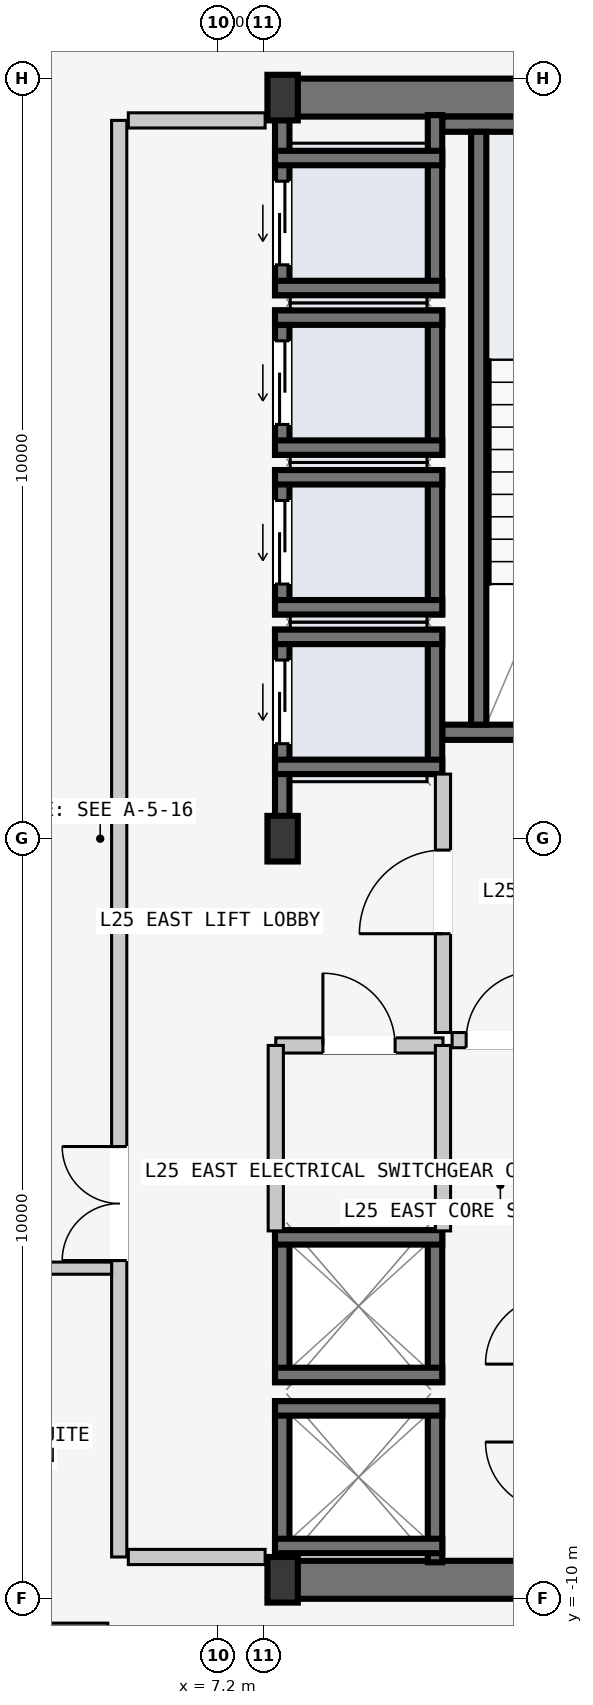
"""IFC4 building model, lengths in metres.
Left out: names, types, materials, properties, quantities, classifications, styles, units other than length and angle.
Written with IfcOpenShell. Run it as: python <this file> out.ifc"""

import sys

from ifc_helpers import new_model, si_unit, direction, frame, frame_2d, origin, origin_2d, place, context, subcontext, project, spatial, rectangle, i_section, extrude, element, fill, save


model = new_model("IFC4")
c1 = context("Model", 3, precision=1e-05, world=origin(), true_north=direction((0.0, 1.0)))
c2 = subcontext(c1, "Body", "Model", "MODEL_VIEW")
j1 = project(units=[si_unit("LENGTHUNIT", "METRE"), si_unit("PLANEANGLEUNIT", "RADIAN")], contexts=[c1])
p1 = place(None, origin())
s1 = spatial("IfcSite", under=j1, at=p1, CompositionType="ELEMENT")
p2 = place(p1, origin())
s2 = spatial("IfcBuilding", under=s1, at=p2, CompositionType="ELEMENT")
p3 = place(p2, frame((0.0, 0.0, 99.0)))
s3 = spatial("IfcBuildingStorey", under=s2, at=p3, CompositionType="ELEMENT", Elevation=99.0)
for number, where, z_axis, x_axis in (
    (1, (8.07, -9.75, -0.2), (0.0, 0.0, 1.0), (1.0, 0.0, 0.0)),
    (2, (8.07, 9.75, -0.2), (0.0, 0.0, 1.0), (1.0, 0.0, 0.0)),
):
    element("IfcWall", number, at=place(p3, frame(where, z_axis=z_axis, x_axis=x_axis)), inside=s3, PredefinedType="SHEAR", context=c2, shape_type="SweptSolid", body=[
        extrude(rectangle(XDim=6.46, YDim=0.5, at=frame_2d((3.23, 0.0))), origin(), (0.0, 0.0, 1.0), 3.6),
    ])
p4 = place(p3, frame((10.15, 1.4, -0.2), z_axis=(0.0, 0.0, 1.0), x_axis=(1.0, 0.0, 0.0)))
e3 = element("IfcWall", 3, at=p4, inside=s3, PredefinedType="SOLIDWALL", context=c2, shape_type="SweptSolid", body=[
    extrude(rectangle(XDim=4.1, YDim=0.2, at=frame_2d((2.05, 0.0))), origin(), (0.0, 0.0, 1.0), 3.6),
])
p5 = place(p4, frame((1.5, 0.0, 0.2)))
e4 = element("IfcOpeningElement", 4, at=p5, cuts=e3, PredefinedType="OPENING", context=c2, shape_type="SweptSolid", body=[
    extrude(rectangle(XDim=1.12, YDim=2.18, at=frame_2d((0.56, 1.09))), frame((0.0, 0.11, 0.0), z_axis=(0.0, -1.0, 0.0), x_axis=(1.0, 0.0, 0.0)), (0.0, 0.0, 1.0), 0.22),
])
p6 = place(p3, frame((10.15, 9.4, -0.2), z_axis=(0.0, 0.0, 1.0), x_axis=(1.0, 0.0, 0.0)))
e5 = element("IfcWall", 5, at=p6, inside=s3, PredefinedType="SOLIDWALL", context=c2, shape_type="SweptSolid", body=[
    extrude(rectangle(XDim=4.1, YDim=0.2, at=frame_2d((2.05, 0.0))), origin(), (0.0, 0.0, 1.0), 3.6),
])
p7 = place(p3, frame((10.63, 1.5, -0.2), z_axis=(0.0, 0.0, 1.0), x_axis=(0.0, 1.0, 0.0)))
e6 = element("IfcWall", 6, at=p7, inside=s3, PredefinedType="SOLIDWALL", context=c2, shape_type="SweptSolid", body=[
    extrude(rectangle(XDim=7.8, YDim=0.2, at=frame_2d((3.9, 0.0))), origin(), (0.0, 0.0, 1.0), 3.6),
])
for number, where, z_axis, x_axis in (
    (7, (8.05, -9.75, 0.0), (0.0, 0.0, 1.0), (1.0, 0.0, 0.0)),
    (8, (8.05, 0.0, 0.0), (0.0, 0.0, 1.0), (1.0, 0.0, 0.0)),
    (9, (8.05, 9.75, 0.0), (0.0, 0.0, 1.0), (1.0, 0.0, 0.0)),
):
    element("IfcColumn", number, at=place(p3, frame(where, z_axis=z_axis, x_axis=x_axis)), inside=s3, PredefinedType="COLUMN", context=c2, shape_type="SweptSolid", body=[
        extrude(i_section(OverallWidth=0.4, OverallDepth=0.6, WebThickness=0.022, FlangeThickness=0.036, at=origin_2d()), origin(), (0.0, 0.0, 1.0), 3.6),
    ])
p8 = place(p3, frame((8.045, 0.21, -0.2), z_axis=(0.0, 0.0, 1.0), x_axis=(0.0, 1.0, 0.0)))
e10 = element("IfcWall", 10, at=p8, inside=s3, PredefinedType="SOLIDWALL", context=c2, shape_type="SweptSolid", body=[
    extrude(rectangle(XDim=2.54, YDim=0.19, at=frame_2d((1.27, 0.0))), origin(), (0.0, 0.0, 1.0), 3.6),
])
p9 = place(p8, frame((1.04, 0.0, 0.2)))
e11 = element("IfcOpeningElement", 11, at=p9, cuts=e10, PredefinedType="OPENING", context=c2, shape_type="SweptSolid", body=[
    extrude(rectangle(XDim=1.1, YDim=2.2, at=frame_2d((0.55, 1.1))), frame((0.0, 0.105, 0.0), z_axis=(0.0, -1.0, 0.0), x_axis=(1.0, 0.0, 0.0)), (0.0, 0.0, 1.0), 0.21),
])
p10 = place(p3, frame((10.055, 0.85, -0.2), z_axis=(0.0, 0.0, 1.0), x_axis=(0.0, 1.0, 0.0)))
e12 = element("IfcWall", 12, at=p10, inside=s3, PredefinedType="SOLIDWALL", context=c2, shape_type="SweptSolid", body=[
    extrude(rectangle(XDim=1.9, YDim=0.19, at=frame_2d((0.95, 0.0))), origin(), (0.0, 0.0, 1.0), 3.6),
])
for number, where, z_axis, x_axis in (
    (13, (7.95, 2.655, -0.2), (0.0, 0.0, 1.0), (1.0, 0.0, 0.0)),
    (14, (7.95, 0.945, -0.2), (0.0, 0.0, 1.0), (1.0, 0.0, 0.0)),
):
    element("IfcWall", number, at=place(p3, frame(where, z_axis=z_axis, x_axis=x_axis)), inside=s3, PredefinedType="SOLIDWALL", context=c2, shape_type="SweptSolid", body=[
        extrude(rectangle(XDim=2.2, YDim=0.19, at=frame_2d((1.1, 0.0))), origin(), (0.0, 0.0, 1.0), 3.6),
    ])
p11 = place(p3, frame((8.045, 2.95, -0.2), z_axis=(0.0, 0.0, 1.0), x_axis=(0.0, 1.0, 0.0)))
e15 = element("IfcWall", 15, at=p11, inside=s3, PredefinedType="SOLIDWALL", context=c2, shape_type="SweptSolid", body=[
    extrude(rectangle(XDim=1.9, YDim=0.19, at=frame_2d((0.95, 0.0))), origin(), (0.0, 0.0, 1.0), 3.6),
])
p12 = place(p11, frame((0.4, 0.0, 0.2)))
e16 = element("IfcOpeningElement", 16, at=p12, cuts=e15, PredefinedType="OPENING", context=c2, shape_type="SweptSolid", body=[
    extrude(rectangle(XDim=1.1, YDim=2.2, at=frame_2d((0.55, 1.1))), frame((0.0, 0.105, 0.0), z_axis=(0.0, -1.0, 0.0), x_axis=(1.0, 0.0, 0.0)), (0.0, 0.0, 1.0), 0.21),
])
p13 = place(p3, frame((10.055, 2.95, -0.2), z_axis=(0.0, 0.0, 1.0), x_axis=(0.0, 1.0, 0.0)))
e17 = element("IfcWall", 17, at=p13, inside=s3, PredefinedType="SOLIDWALL", context=c2, shape_type="SweptSolid", body=[
    extrude(rectangle(XDim=1.9, YDim=0.19, at=frame_2d((0.95, 0.0))), origin(), (0.0, 0.0, 1.0), 3.6),
])
for number, where, z_axis, x_axis in (
    (18, (7.95, 4.755, -0.2), (0.0, 0.0, 1.0), (1.0, 0.0, 0.0)),
    (19, (7.95, 3.045, -0.2), (0.0, 0.0, 1.0), (1.0, 0.0, 0.0)),
):
    element("IfcWall", number, at=place(p3, frame(where, z_axis=z_axis, x_axis=x_axis)), inside=s3, PredefinedType="SOLIDWALL", context=c2, shape_type="SweptSolid", body=[
        extrude(rectangle(XDim=2.2, YDim=0.19, at=frame_2d((1.1, 0.0))), origin(), (0.0, 0.0, 1.0), 3.6),
    ])
p14 = place(p3, frame((8.045, 5.05, -0.2), z_axis=(0.0, 0.0, 1.0), x_axis=(0.0, 1.0, 0.0)))
e20 = element("IfcWall", 20, at=p14, inside=s3, PredefinedType="SOLIDWALL", context=c2, shape_type="SweptSolid", body=[
    extrude(rectangle(XDim=1.9, YDim=0.19, at=frame_2d((0.95, 0.0))), origin(), (0.0, 0.0, 1.0), 3.6),
])
p15 = place(p14, frame((0.4, 0.0, 0.2)))
e21 = element("IfcOpeningElement", 21, at=p15, cuts=e20, PredefinedType="OPENING", context=c2, shape_type="SweptSolid", body=[
    extrude(rectangle(XDim=1.1, YDim=2.2, at=frame_2d((0.55, 1.1))), frame((0.0, 0.105, 0.0), z_axis=(0.0, -1.0, 0.0), x_axis=(1.0, 0.0, 0.0)), (0.0, 0.0, 1.0), 0.21),
])
p16 = place(p3, frame((10.055, 5.05, -0.2), z_axis=(0.0, 0.0, 1.0), x_axis=(0.0, 1.0, 0.0)))
e22 = element("IfcWall", 22, at=p16, inside=s3, PredefinedType="SOLIDWALL", context=c2, shape_type="SweptSolid", body=[
    extrude(rectangle(XDim=1.9, YDim=0.19, at=frame_2d((0.95, 0.0))), origin(), (0.0, 0.0, 1.0), 3.6),
])
for number, where, z_axis, x_axis in (
    (23, (7.95, 6.855, -0.2), (0.0, 0.0, 1.0), (1.0, 0.0, 0.0)),
    (24, (7.95, 5.145, -0.2), (0.0, 0.0, 1.0), (1.0, 0.0, 0.0)),
):
    element("IfcWall", number, at=place(p3, frame(where, z_axis=z_axis, x_axis=x_axis)), inside=s3, PredefinedType="SOLIDWALL", context=c2, shape_type="SweptSolid", body=[
        extrude(rectangle(XDim=2.2, YDim=0.19, at=frame_2d((1.1, 0.0))), origin(), (0.0, 0.0, 1.0), 3.6),
    ])
p17 = place(p3, frame((8.045, 7.15, -0.2), z_axis=(0.0, 0.0, 1.0), x_axis=(0.0, 1.0, 0.0)))
e25 = element("IfcWall", 25, at=p17, inside=s3, PredefinedType="SOLIDWALL", context=c2, shape_type="SweptSolid", body=[
    extrude(rectangle(XDim=2.37, YDim=0.19, at=frame_2d((1.185, 0.0))), origin(), (0.0, 0.0, 1.0), 3.6),
])
p18 = place(p17, frame((0.4, 0.0, 0.2)))
e26 = element("IfcOpeningElement", 26, at=p18, cuts=e25, PredefinedType="OPENING", context=c2, shape_type="SweptSolid", body=[
    extrude(rectangle(XDim=1.1, YDim=2.2, at=frame_2d((0.55, 1.1))), frame((0.0, 0.105, 0.0), z_axis=(0.0, -1.0, 0.0), x_axis=(1.0, 0.0, 0.0)), (0.0, 0.0, 1.0), 0.21),
])
p19 = place(p3, frame((10.055, 7.15, -0.2), z_axis=(0.0, 0.0, 1.0), x_axis=(0.0, 1.0, 0.0)))
e27 = element("IfcWall", 27, at=p19, inside=s3, PredefinedType="SOLIDWALL", context=c2, shape_type="SweptSolid", body=[
    extrude(rectangle(XDim=2.37, YDim=0.19, at=frame_2d((1.185, 0.0))), origin(), (0.0, 0.0, 1.0), 3.6),
])
for number, where, z_axis, x_axis in (
    (28, (7.95, 8.955, -0.2), (0.0, 0.0, 1.0), (1.0, 0.0, 0.0)),
    (29, (7.95, 7.245, -0.2), (0.0, 0.0, 1.0), (1.0, 0.0, 0.0)),
):
    element("IfcWall", number, at=place(p3, frame(where, z_axis=z_axis, x_axis=x_axis)), inside=s3, PredefinedType="SOLIDWALL", context=c2, shape_type="SweptSolid", body=[
        extrude(rectangle(XDim=2.2, YDim=0.19, at=frame_2d((1.1, 0.0))), origin(), (0.0, 0.0, 1.0), 3.6),
    ])
for number, where, z_axis, x_axis in (
    (30, (8.045, -9.52, -0.2), (0.0, 0.0, 1.0), (0.0, 1.0, 0.0)),
    (31, (10.055, -9.52, -0.2), (0.0, 0.0, 1.0), (0.0, 1.0, 0.0)),
):
    element("IfcWall", number, at=place(p3, frame(where, z_axis=z_axis, x_axis=x_axis)), inside=s3, PredefinedType="SOLIDWALL", context=c2, shape_type="SweptSolid", body=[
        extrude(rectangle(XDim=2.12, YDim=0.19, at=frame_2d((1.06, 0.0))), origin(), (0.0, 0.0, 1.0), 3.6),
    ])
for number, where, z_axis, x_axis in (
    (32, (7.95, -7.495, -0.2), (0.0, 0.0, 1.0), (1.0, 0.0, 0.0)),
    (33, (7.95, -9.305, -0.2), (0.0, 0.0, 1.0), (1.0, 0.0, 0.0)),
):
    element("IfcWall", number, at=place(p3, frame(where, z_axis=z_axis, x_axis=x_axis)), inside=s3, PredefinedType="SOLIDWALL", context=c2, shape_type="SweptSolid", body=[
        extrude(rectangle(XDim=2.2, YDim=0.19, at=frame_2d((1.1, 0.0))), origin(), (0.0, 0.0, 1.0), 3.6),
    ])
for number, where, z_axis, x_axis in (
    (34, (8.045, -7.15, -0.2), (0.0, 0.0, 1.0), (0.0, 1.0, 0.0)),
    (35, (10.055, -7.15, -0.2), (0.0, 0.0, 1.0), (0.0, 1.0, 0.0)),
):
    element("IfcWall", number, at=place(p3, frame(where, z_axis=z_axis, x_axis=x_axis)), inside=s3, PredefinedType="SOLIDWALL", context=c2, shape_type="SweptSolid", body=[
        extrude(rectangle(XDim=2.0, YDim=0.19, at=frame_2d((1.0, 0.0))), origin(), (0.0, 0.0, 1.0), 3.6),
    ])
for number, where, z_axis, x_axis in (
    (36, (7.95, -5.245, -0.2), (0.0, 0.0, 1.0), (1.0, 0.0, 0.0)),
    (37, (7.95, -7.055, -0.2), (0.0, 0.0, 1.0), (1.0, 0.0, 0.0)),
):
    element("IfcWall", number, at=place(p3, frame(where, z_axis=z_axis, x_axis=x_axis)), inside=s3, PredefinedType="SOLIDWALL", context=c2, shape_type="SweptSolid", body=[
        extrude(rectangle(XDim=2.2, YDim=0.19, at=frame_2d((1.1, 0.0))), origin(), (0.0, 0.0, 1.0), 3.6),
    ])
p20 = place(p3, frame((5.9, -9.45, 0.0), z_axis=(0.0, 0.0, 1.0), x_axis=(0.0, 1.0, 0.0)))
e38 = element("IfcWall", 38, at=p20, inside=s3, PredefinedType="PARTITIONING", context=c2, shape_type="SweptSolid", body=[
    extrude(rectangle(XDim=18.9, YDim=0.2, at=frame_2d((9.45, 0.0))), origin(), (0.0, 0.0, 1.0), 3.4),
])
p21 = place(p20, frame((3.9, 0.0, 0.0)))
e39 = element("IfcOpeningElement", 39, at=p21, cuts=e38, PredefinedType="OPENING", context=c2, shape_type="SweptSolid", body=[
    extrude(rectangle(XDim=1.5, YDim=2.2, at=frame_2d((0.75, 1.1))), frame((0.0, 0.11, 0.0), z_axis=(0.0, -1.0, 0.0), x_axis=(1.0, 0.0, 0.0)), (0.0, 0.0, 1.0), 0.22),
])
for number, where, z_axis, x_axis in (
    (40, (6.02, -9.45, 0.0), (0.0, 0.0, 1.0), (1.0, 0.0, 0.0)),
    (41, (6.02, 9.45, 0.0), (0.0, 0.0, 1.0), (1.0, 0.0, 0.0)),
):
    element("IfcWall", number, at=place(p3, frame(where, z_axis=z_axis, x_axis=x_axis)), inside=s3, PredefinedType="PARTITIONING", context=c2, shape_type="SweptSolid", body=[
        extrude(rectangle(XDim=1.8, YDim=0.2, at=frame_2d((0.9, 0.0))), origin(), (0.0, 0.0, 1.0), 3.4),
    ])
p22 = place(p3, frame((10.16, -2.55, 0.0), z_axis=(0.0, 0.0, 1.0), x_axis=(0.0, 1.0, 0.0)))
e42 = element("IfcWall", 42, at=p22, inside=s3, PredefinedType="PARTITIONING", context=c2, shape_type="SweptSolid", body=[
    extrude(rectangle(XDim=3.4, YDim=0.2, at=frame_2d((1.7, 0.0))), origin(), (0.0, 0.0, 1.0), 3.4),
])
p23 = place(p22, frame((1.3, 0.0, 0.0)))
e43 = element("IfcOpeningElement", 43, at=p23, cuts=e42, PredefinedType="OPENING", context=c2, shape_type="SweptSolid", body=[
    extrude(rectangle(XDim=1.1, YDim=2.15, at=frame_2d((0.55, 1.075))), frame((0.0, 0.11, 0.0), z_axis=(0.0, -1.0, 0.0), x_axis=(1.0, 0.0, 0.0)), (0.0, 0.0, 1.0), 0.22),
])
p24 = place(p3, frame((10.28, -2.65, 0.0), z_axis=(0.0, 0.0, 1.0), x_axis=(1.0, 0.0, 0.0)))
e44 = element("IfcWall", 44, at=p24, inside=s3, PredefinedType="PARTITIONING", context=c2, shape_type="SweptSolid", body=[
    extrude(rectangle(XDim=1.27, YDim=0.2, at=frame_2d((0.635, 0.0))), origin(), (0.0, 0.0, 1.0), 3.4),
])
p25 = place(p24, frame((0.185, 0.0, 0.0)))
e45 = element("IfcOpeningElement", 45, at=p25, cuts=e44, PredefinedType="OPENING", context=c2, shape_type="SweptSolid", body=[
    extrude(rectangle(XDim=0.9, YDim=2.15, at=frame_2d((0.45, 1.075))), frame((0.0, 0.11, 0.0), z_axis=(0.0, -1.0, 0.0), x_axis=(1.0, 0.0, 0.0)), (0.0, 0.0, 1.0), 0.22),
])
p26 = place(p3, frame((7.96, -2.72, 0.0), z_axis=(0.0, 0.0, 1.0), x_axis=(1.0, 0.0, 0.0)))
e46 = element("IfcWall", 46, at=p26, inside=s3, PredefinedType="PARTITIONING", context=c2, shape_type="SweptSolid", body=[
    extrude(rectangle(XDim=2.2, YDim=0.2, at=frame_2d((1.1, 0.0))), origin(), (0.0, 0.0, 1.0), 3.4),
])
p27 = place(p26, frame((0.62, 0.0, 0.0)))
e47 = element("IfcOpeningElement", 47, at=p27, cuts=e46, PredefinedType="OPENING", context=c2, shape_type="SweptSolid", body=[
    extrude(rectangle(XDim=0.95, YDim=2.1, at=frame_2d((0.475, 1.05))), frame((0.0, 0.11, 0.0), z_axis=(0.0, -1.0, 0.0), x_axis=(1.0, 0.0, 0.0)), (0.0, 0.0, 1.0), 0.22),
])
for number, where, z_axis, x_axis in (
    (48, (7.96, -5.16, 0.0), (0.0, 0.0, 1.0), (0.0, 1.0, 0.0)),
    (49, (10.16, -5.16, 0.0), (0.0, 0.0, 1.0), (0.0, 1.0, 0.0)),
):
    element("IfcWall", number, at=place(p3, frame(where, z_axis=z_axis, x_axis=x_axis)), inside=s3, PredefinedType="PARTITIONING", context=c2, shape_type="SweptSolid", body=[
        extrude(rectangle(XDim=2.44, YDim=0.2, at=frame_2d((1.22, 0.0))), origin(), (0.0, 0.0, 1.0), 3.4),
    ])
p28 = place(p3, frame((-5.8, -5.65, 0.0), z_axis=(0.0, 0.0, 1.0), x_axis=(1.0, 0.0, 0.0)))
e50 = element("IfcWall", 50, at=p28, inside=s3, PredefinedType="PARTITIONING", context=c2, shape_type="SweptSolid", body=[
    extrude(rectangle(XDim=11.6, YDim=0.16, at=frame_2d((5.8, 0.0))), origin(), (0.0, 0.0, 1.0), 3.4),
])
p29 = place(p28, frame((5.1, 0.0, 0.0)))
e51 = element("IfcOpeningElement", 51, at=p29, cuts=e50, PredefinedType="OPENING", context=c2, shape_type="SweptSolid", body=[
    extrude(rectangle(XDim=1.4, YDim=2.2, at=frame_2d((0.7, 1.1))), frame((0.0, 0.09, 0.0), z_axis=(0.0, -1.0, 0.0), x_axis=(1.0, 0.0, 0.0)), (0.0, 0.0, 1.0), 0.18),
])
p30 = place(p3, frame((-5.75, -10.4, 0.0), z_axis=(0.0, 0.0, 1.0), x_axis=(1.0, 0.0, 0.0)))
e52 = element("IfcWall", 52, at=p30, inside=s3, PredefinedType="PARTITIONING", context=c2, shape_type="SweptSolid", body=[
    extrude(rectangle(XDim=11.5, YDim=0.16, at=frame_2d((5.75, 0.0))), origin(), (0.0, 0.0, 1.0), 3.4),
])
p31 = place(p30, frame((5.27, 0.0, 0.0)))
e53 = element("IfcOpeningElement", 53, at=p31, cuts=e52, PredefinedType="OPENING", context=c2, shape_type="SweptSolid", body=[
    extrude(rectangle(XDim=0.96, YDim=2.18, at=frame_2d((0.48, 1.09))), frame((0.0, 0.09, 0.0), z_axis=(0.0, -1.0, 0.0), x_axis=(1.0, 0.0, 0.0)), (0.0, 0.0, 1.0), 0.18),
])
p32 = place(p9, origin())
e54 = element("IfcDoor", 54, at=p32, inside=s3, OperationType="SLIDING_TO_LEFT", PredefinedType="DOOR", context=c2, shape_type="SweptSolid", body=[
    extrude(rectangle(XDim=1.1, YDim=2.2, at=frame_2d((0.55, 1.1))), frame((0.0, 0.025, 0.0), z_axis=(0.0, -1.0, 0.0), x_axis=(1.0, 0.0, 0.0)), (0.0, 0.0, 1.0), 0.05),
])
fill(e11, e54)
p33 = place(p12, origin())
e55 = element("IfcDoor", 55, at=p33, inside=s3, OperationType="SLIDING_TO_LEFT", PredefinedType="DOOR", context=c2, shape_type="SweptSolid", body=[
    extrude(rectangle(XDim=1.1, YDim=2.2, at=frame_2d((0.55, 1.1))), frame((0.0, 0.025, 0.0), z_axis=(0.0, -1.0, 0.0), x_axis=(1.0, 0.0, 0.0)), (0.0, 0.0, 1.0), 0.05),
])
fill(e16, e55)
p34 = place(p15, origin())
e56 = element("IfcDoor", 56, at=p34, inside=s3, OperationType="SLIDING_TO_LEFT", PredefinedType="DOOR", context=c2, shape_type="SweptSolid", body=[
    extrude(rectangle(XDim=1.1, YDim=2.2, at=frame_2d((0.55, 1.1))), frame((0.0, 0.025, 0.0), z_axis=(0.0, -1.0, 0.0), x_axis=(1.0, 0.0, 0.0)), (0.0, 0.0, 1.0), 0.05),
])
fill(e21, e56)
p35 = place(p18, origin())
e57 = element("IfcDoor", 57, at=p35, inside=s3, OperationType="SLIDING_TO_LEFT", PredefinedType="DOOR", context=c2, shape_type="SweptSolid", body=[
    extrude(rectangle(XDim=1.1, YDim=2.2, at=frame_2d((0.55, 1.1))), frame((0.0, 0.025, 0.0), z_axis=(0.0, -1.0, 0.0), x_axis=(1.0, 0.0, 0.0)), (0.0, 0.0, 1.0), 0.05),
])
fill(e26, e57)
p36 = place(p21, origin())
e58 = element("IfcDoor", 58, at=p36, inside=s3, OperationType="DOUBLE_DOOR_SINGLE_SWING", PredefinedType="DOOR", context=c2, shape_type="SweptSolid", body=[
    extrude(rectangle(XDim=1.5, YDim=2.2, at=frame_2d((0.75, 1.1))), frame((0.0, 0.025, 0.0), z_axis=(0.0, -1.0, 0.0), x_axis=(1.0, 0.0, 0.0)), (0.0, 0.0, 1.0), 0.05),
])
fill(e39, e58)
p37 = place(p23, origin())
e59 = element("IfcDoor", 59, at=p37, inside=s3, OperationType="SINGLE_SWING_LEFT", PredefinedType="DOOR", context=c2, shape_type="SweptSolid", body=[
    extrude(rectangle(XDim=1.1, YDim=2.15, at=frame_2d((0.55, 1.075))), frame((0.0, 0.025, 0.0), z_axis=(0.0, -1.0, 0.0), x_axis=(1.0, 0.0, 0.0)), (0.0, 0.0, 1.0), 0.05),
])
fill(e43, e59)
p38 = place(p25, origin())
e60 = element("IfcDoor", 60, at=p38, inside=s3, OperationType="SINGLE_SWING_RIGHT", PredefinedType="DOOR", context=c2, shape_type="SweptSolid", body=[
    extrude(rectangle(XDim=0.9, YDim=2.15, at=frame_2d((0.45, 1.075))), frame((0.0, 0.025, 0.0), z_axis=(0.0, -1.0, 0.0), x_axis=(1.0, 0.0, 0.0)), (0.0, 0.0, 1.0), 0.05),
])
fill(e45, e60)
p39 = place(p27, origin())
e61 = element("IfcDoor", 61, at=p39, inside=s3, OperationType="SINGLE_SWING_LEFT", PredefinedType="DOOR", context=c2, shape_type="SweptSolid", body=[
    extrude(rectangle(XDim=0.95, YDim=2.1, at=frame_2d((0.475, 1.05))), frame((0.0, 0.025, 0.0), z_axis=(0.0, -1.0, 0.0), x_axis=(1.0, 0.0, 0.0)), (0.0, 0.0, 1.0), 0.05),
])
fill(e47, e61)
save(model, sys.argv[1])
